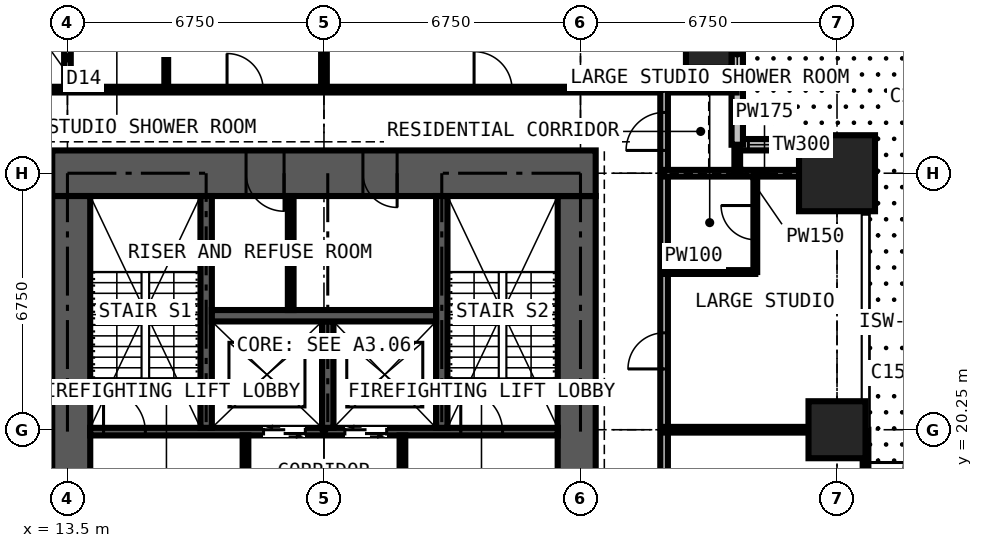
"""IFC4 building model, lengths in metres.
Left out: names, types, materials, properties, quantities, classifications, styles, units other than length and angle.
Written with IfcOpenShell. Run it as: python <this file> out.ifc"""

import sys

from ifc_helpers import new_model, si_unit, direction, frame, frame_2d, origin, origin_2d, place, context, subcontext, project, spatial, rectangle, extrude, element, fill, save


model = new_model("IFC4")
c1 = context("Model", 3, precision=1e-05, world=origin(), true_north=direction((0.0, 1.0)))
c2 = subcontext(c1, "Body", "Model", "MODEL_VIEW")
j1 = project(units=[si_unit("LENGTHUNIT", "METRE"), si_unit("PLANEANGLEUNIT", "RADIAN")], contexts=[c1])
p1 = place(None, origin())
s1 = spatial("IfcSite", under=j1, at=p1, CompositionType="ELEMENT")
p2 = place(p1, origin())
s2 = spatial("IfcBuilding", under=s1, at=p2, CompositionType="ELEMENT")
p3 = place(p2, frame((0.0, 0.0, 142.2)))
s3 = spatial("IfcBuildingStorey", under=s2, at=p3, CompositionType="ELEMENT", Elevation=142.2)
p4 = place(p3, frame((30.375, 30.375, 0.0), z_axis=(0.0, 0.0, 1.0), x_axis=(1.0, 0.0, 0.0)))
e1 = element("IfcColumn", 1, at=p4, inside=s3, PredefinedType="COLUMN", context=c2, shape_type="SweptSolid", body=[
    extrude(rectangle(XDim=1.2, YDim=1.2, at=origin_2d()), origin(), (0.0, 0.0, 1.0), 3.6),
])
p5 = place(p3, frame((33.75, 20.25, 0.0), z_axis=(0.0, 0.0, 1.0), x_axis=(1.0, 0.0, 0.0)))
e2 = element("IfcColumn", 2, at=p5, inside=s3, PredefinedType="COLUMN", context=c2, shape_type="SweptSolid", body=[
    extrude(rectangle(XDim=1.5, YDim=1.5, at=origin_2d()), origin(), (0.0, 0.0, 1.0), 3.6),
])
p6 = place(p3, frame((33.75, 27.0, 0.0), z_axis=(0.0, 0.0, 1.0), x_axis=(1.0, 0.0, 0.0)))
e3 = element("IfcColumn", 3, at=p6, inside=s3, PredefinedType="COLUMN", context=c2, shape_type="SweptSolid", body=[
    extrude(rectangle(XDim=2.0, YDim=2.0, at=origin_2d()), origin(), (0.0, 0.0, 1.0), 3.6),
])
p7 = place(p3, frame((26.9, 14.1, 0.0), z_axis=(0.0, 0.0, 1.0), x_axis=(0.0, 1.0, 0.0)))
e4 = element("IfcWall", 4, at=p7, inside=s3, PredefinedType="SHEAR", context=c2, shape_type="SweptSolid", body=[
    extrude(rectangle(XDim=12.3, YDim=1.0, at=frame_2d((6.15, 0.0))), origin(), (0.0, 0.0, 1.0), 3.6),
])
p8 = place(p7, frame((3.65, 0.0, 0.0)))
e5 = element("IfcOpeningElement", 5, at=p8, cuts=e4, PredefinedType="OPENING", context=c2, shape_type="SweptSolid", body=[
    extrude(rectangle(XDim=1.2, YDim=2.2, at=frame_2d((0.6, 1.1))), frame((0.0, 0.51, 0.0), z_axis=(0.0, -1.0, 0.0), x_axis=(1.0, 0.0, 0.0)), (0.0, 0.0, 1.0), 1.02),
])
p9 = place(p3, frame((27.4, 27.0, 0.0), z_axis=(0.0, 0.0, 1.0), x_axis=(-1.0, 0.0, 0.0)))
e6 = element("IfcWall", 6, at=p9, inside=s3, PredefinedType="SHEAR", context=c2, shape_type="SweptSolid", body=[
    extrude(rectangle(XDim=14.3, YDim=1.2, at=frame_2d((7.15, 0.0))), origin(), (0.0, 0.0, 1.0), 3.6),
])
p10 = place(p9, frame((5.225, 0.0, 0.0)))
e7 = element("IfcOpeningElement", 7, at=p10, cuts=e6, PredefinedType="OPENING", context=c2, shape_type="SweptSolid", body=[
    extrude(rectangle(XDim=0.9, YDim=2.2, at=frame_2d((0.45, 1.1))), frame((0.0, 0.61, 0.0), z_axis=(0.0, -1.0, 0.0), x_axis=(1.0, 0.0, 0.0)), (0.0, 0.0, 1.0), 1.22),
])
p11 = place(p9, frame((8.2, 0.0, 0.0)))
e8 = element("IfcOpeningElement", 8, at=p11, cuts=e6, PredefinedType="OPENING", context=c2, shape_type="SweptSolid", body=[
    extrude(rectangle(XDim=1.0, YDim=2.2, at=frame_2d((0.5, 1.1))), frame((0.0, 0.61, 0.0), z_axis=(0.0, -1.0, 0.0), x_axis=(1.0, 0.0, 0.0)), (0.0, 0.0, 1.0), 1.22),
])
p12 = place(p3, frame((13.6, 26.4, 0.0), z_axis=(0.0, 0.0, 1.0), x_axis=(0.0, -1.0, 0.0)))
e9 = element("IfcWall", 9, at=p12, inside=s3, PredefinedType="SHEAR", context=c2, shape_type="SweptSolid", body=[
    extrude(rectangle(XDim=12.3, YDim=1.0, at=frame_2d((6.15, 0.0))), origin(), (0.0, 0.0, 1.0), 3.6),
])
p13 = place(p12, frame((7.45, 0.0, 0.0)))
e10 = element("IfcOpeningElement", 10, at=p13, cuts=e9, PredefinedType="OPENING", context=c2, shape_type="SweptSolid", body=[
    extrude(rectangle(XDim=1.2, YDim=2.2, at=frame_2d((0.6, 1.1))), frame((0.0, 0.51, 0.0), z_axis=(0.0, -1.0, 0.0), x_axis=(1.0, 0.0, 0.0)), (0.0, 0.0, 1.0), 1.02),
])
p14 = place(p3, frame((34.5, 20.25, 0.0), z_axis=(0.0, 0.0, 1.0), x_axis=(0.0, -1.0, 0.0)))
e11 = element("IfcWall", 11, at=p14, inside=s3, PredefinedType="SOLIDWALL", context=c2, shape_type="SweptSolid", body=[
    extrude(rectangle(XDim=6.75, YDim=0.15, at=frame_2d((3.375, 0.0))), origin(), (0.0, 0.0, 1.0), 3.375),
])
p15 = place(p14, frame((0.863, 0.0, 0.0)))
e12 = element("IfcOpeningElement", 12, at=p15, cuts=e11, PredefinedType="OPENING", context=c2, shape_type="SweptSolid", body=[
    extrude(rectangle(XDim=1.0, YDim=2.2, at=frame_2d((0.5, 1.1))), frame((0.0, 0.085, 0.0), z_axis=(0.0, -1.0, 0.0), x_axis=(1.0, 0.0, 0.0)), (0.0, 0.0, 1.0), 0.17),
])
p16 = place(p14, frame((1.975, 0.0, 0.9)))
e13 = element("IfcOpeningElement", 13, at=p16, cuts=e11, PredefinedType="OPENING", context=c2, shape_type="SweptSolid", body=[
    extrude(rectangle(XDim=1.2, YDim=1.8, at=frame_2d((0.6, 0.9))), frame((0.0, 0.085, 0.0), z_axis=(0.0, -1.0, 0.0), x_axis=(1.0, 0.0, 0.0)), (0.0, 0.0, 1.0), 0.17),
])
p17 = place(p14, frame((4.621, 0.0, 0.0)))
e14 = element("IfcOpeningElement", 14, at=p17, cuts=e11, PredefinedType="OPENING", context=c2, shape_type="SweptSolid", body=[
    extrude(rectangle(XDim=1.0, YDim=2.2, at=frame_2d((0.5, 1.1))), frame((0.0, 0.085, 0.0), z_axis=(0.0, -1.0, 0.0), x_axis=(1.0, 0.0, 0.0)), (0.0, 0.0, 1.0), 0.17),
])
p18 = place(p14, frame((3.592, 0.0, 0.9)))
e15 = element("IfcOpeningElement", 15, at=p18, cuts=e11, PredefinedType="OPENING", context=c2, shape_type="SweptSolid", body=[
    extrude(rectangle(XDim=0.9, YDim=1.8, at=frame_2d((0.45, 0.9))), frame((0.0, 0.085, 0.0), z_axis=(0.0, -1.0, 0.0), x_axis=(1.0, 0.0, 0.0)), (0.0, 0.0, 1.0), 0.17),
])
p19 = place(p3, frame((34.5, 27.75, 0.0), z_axis=(0.0, 0.0, 1.0), x_axis=(-1.0, 0.0, 0.0)))
e16 = element("IfcWall", 16, at=p19, inside=s3, PredefinedType="SOLIDWALL", context=c2, shape_type="SweptSolid", body=[
    extrude(rectangle(XDim=3.375, YDim=0.3, at=frame_2d((1.688, 0.0))), origin(), (0.0, 0.0, 1.0), 3.375),
])
p20 = place(p19, frame((1.883, 0.0, 0.9)))
e17 = element("IfcOpeningElement", 17, at=p20, cuts=e16, PredefinedType="OPENING", context=c2, shape_type="SweptSolid", body=[
    extrude(rectangle(XDim=1.2, YDim=1.8, at=frame_2d((0.6, 0.9))), frame((0.0, 0.16, 0.0), z_axis=(0.0, -1.0, 0.0), x_axis=(1.0, 0.0, 0.0)), (0.0, 0.0, 1.0), 0.32),
])
p21 = place(p3, frame((31.125, 27.75, 0.0), z_axis=(0.0, 0.0, 1.0), x_axis=(0.0, 1.0, 0.0)))
e18 = element("IfcWall", 18, at=p21, inside=s3, PredefinedType="SOLIDWALL", context=c2, shape_type="SweptSolid", body=[
    extrude(rectangle(XDim=3.375, YDim=0.3, at=frame_2d((1.688, 0.0))), origin(), (0.0, 0.0, 1.0), 3.375),
])
p22 = place(p21, frame((1.663, 0.0, 0.9)))
e19 = element("IfcOpeningElement", 19, at=p22, cuts=e18, PredefinedType="OPENING", context=c2, shape_type="SweptSolid", body=[
    extrude(rectangle(XDim=1.5, YDim=1.8, at=frame_2d((0.75, 0.9))), frame((0.0, 0.16, 0.0), z_axis=(0.0, -1.0, 0.0), x_axis=(1.0, 0.0, 0.0)), (0.0, 0.0, 1.0), 0.32),
])
p23 = place(p3, frame((14.1, 20.2, 0.0), z_axis=(0.0, 0.0, 1.0), x_axis=(1.0, 0.0, 0.0)))
e20 = element("IfcWall", 20, at=p23, inside=s3, PredefinedType="SHEAR", context=c2, shape_type="SweptSolid", body=[
    extrude(rectangle(XDim=12.3, YDim=0.2, at=frame_2d((6.15, 0.0))), origin(), (0.0, 0.0, 1.0), 3.6),
])
p24 = place(p23, frame((4.56, 0.0, 0.0)))
e21 = element("IfcOpeningElement", 21, at=p24, cuts=e20, PredefinedType="OPENING", context=c2, shape_type="SweptSolid", body=[
    extrude(rectangle(XDim=1.1, YDim=2.2, at=frame_2d((0.55, 1.1))), frame((0.0, 0.11, 0.0), z_axis=(0.0, -1.0, 0.0), x_axis=(1.0, 0.0, 0.0)), (0.0, 0.0, 1.0), 0.22),
])
p25 = place(p23, frame((6.7, 0.0, 0.0)))
e22 = element("IfcOpeningElement", 22, at=p25, cuts=e20, PredefinedType="OPENING", context=c2, shape_type="SweptSolid", body=[
    extrude(rectangle(XDim=1.1, YDim=2.2, at=frame_2d((0.55, 1.1))), frame((0.0, 0.11, 0.0), z_axis=(0.0, -1.0, 0.0), x_axis=(1.0, 0.0, 0.0)), (0.0, 0.0, 1.0), 0.22),
])
p26 = place(p23, frame((0.35, 0.0, 0.0)))
e23 = element("IfcOpeningElement", 23, at=p26, cuts=e20, PredefinedType="OPENING", context=c2, shape_type="SweptSolid", body=[
    extrude(rectangle(XDim=1.1, YDim=2.2, at=frame_2d((0.55, 1.1))), frame((0.0, 0.11, 0.0), z_axis=(0.0, -1.0, 0.0), x_axis=(1.0, 0.0, 0.0)), (0.0, 0.0, 1.0), 0.22),
])
p27 = place(p23, frame((9.75, 0.0, 0.0)))
e24 = element("IfcOpeningElement", 24, at=p27, cuts=e20, PredefinedType="OPENING", context=c2, shape_type="SweptSolid", body=[
    extrude(rectangle(XDim=1.1, YDim=2.2, at=frame_2d((0.55, 1.1))), frame((0.0, 0.11, 0.0), z_axis=(0.0, -1.0, 0.0), x_axis=(1.0, 0.0, 0.0)), (0.0, 0.0, 1.0), 0.22),
])
for number, where, z_axis, x_axis in (
    (25, (17.15, 20.3, 0.0), (0.0, 0.0, 1.0), (0.0, 1.0, 0.0)),
    (26, (23.35, 20.3, 0.0), (0.0, 0.0, 1.0), (0.0, 1.0, 0.0)),
):
    element("IfcWall", number, at=place(p3, frame(where, z_axis=z_axis, x_axis=x_axis)), inside=s3, PredefinedType="SHEAR", context=c2, shape_type="SweptSolid", body=[
        extrude(rectangle(XDim=6.1, YDim=0.3, at=frame_2d((3.05, 0.0))), origin(), (0.0, 0.0, 1.0), 3.6),
    ])
p28 = place(p3, frame((20.35, 20.3, 0.0), z_axis=(0.0, 0.0, 1.0), x_axis=(0.0, 1.0, 0.0)))
e27 = element("IfcWall", 27, at=p28, inside=s3, PredefinedType="SHEAR", context=c2, shape_type="SweptSolid", body=[
    extrude(rectangle(XDim=2.8, YDim=0.3, at=frame_2d((1.4, 0.0))), origin(), (0.0, 0.0, 1.0), 3.6),
])
p29 = place(p3, frame((17.3, 23.25, 0.0), z_axis=(0.0, 0.0, 1.0), x_axis=(1.0, 0.0, 0.0)))
e28 = element("IfcWall", 28, at=p29, inside=s3, PredefinedType="SHEAR", context=c2, shape_type="SweptSolid", body=[
    extrude(rectangle(XDim=5.9, YDim=0.3, at=frame_2d((2.95, 0.0))), origin(), (0.0, 0.0, 1.0), 3.6),
])
p30 = place(p3, frame((18.185, 16.6, 0.0), z_axis=(0.0, 0.0, 1.0), x_axis=(0.0, 1.0, 0.0)))
e29 = element("IfcWall", 29, at=p30, inside=s3, PredefinedType="PARTITIONING", context=c2, shape_type="SweptSolid", body=[
    extrude(rectangle(XDim=3.5, YDim=0.15, at=frame_2d((1.75, 0.0))), origin(), (0.0, 0.0, 1.0), 3.375),
])
p31 = place(p30, frame((1.15, 0.0, 0.0)))
e30 = element("IfcOpeningElement", 30, at=p31, cuts=e29, PredefinedType="OPENING", context=c2, shape_type="SweptSolid", body=[
    extrude(rectangle(XDim=1.2, YDim=2.2, at=frame_2d((0.6, 1.1))), frame((0.0, 0.085, 0.0), z_axis=(0.0, -1.0, 0.0), x_axis=(1.0, 0.0, 0.0)), (0.0, 0.0, 1.0), 0.17),
])
p32 = place(p3, frame((22.315, 16.6, 0.0), z_axis=(0.0, 0.0, 1.0), x_axis=(0.0, 1.0, 0.0)))
e31 = element("IfcWall", 31, at=p32, inside=s3, PredefinedType="PARTITIONING", context=c2, shape_type="SweptSolid", body=[
    extrude(rectangle(XDim=3.5, YDim=0.15, at=frame_2d((1.75, 0.0))), origin(), (0.0, 0.0, 1.0), 3.375),
])
p33 = place(p32, frame((1.15, 0.0, 0.0)))
e32 = element("IfcOpeningElement", 32, at=p33, cuts=e31, PredefinedType="OPENING", context=c2, shape_type="SweptSolid", body=[
    extrude(rectangle(XDim=1.2, YDim=2.2, at=frame_2d((0.6, 1.1))), frame((0.0, 0.085, 0.0), z_axis=(0.0, -1.0, 0.0), x_axis=(1.0, 0.0, 0.0)), (0.0, 0.0, 1.0), 0.17),
])
p34 = place(p3, frame((19.375, 23.4, 0.0), z_axis=(0.0, 0.0, 1.0), x_axis=(0.0, 1.0, 0.0)))
e33 = element("IfcWall", 33, at=p34, inside=s3, PredefinedType="PARTITIONING", context=c2, shape_type="SweptSolid", body=[
    extrude(rectangle(XDim=3.0, YDim=0.15, at=frame_2d((1.5, 0.0))), origin(), (0.0, 0.0, 1.0), 3.375),
])
p35 = place(p3, frame((11.3, 29.2, 0.0), z_axis=(0.0, 0.0, 1.0), x_axis=(1.0, 0.0, 0.0)))
e34 = element("IfcWall", 34, at=p35, inside=s3, PredefinedType="PARTITIONING", context=c2, shape_type="SweptSolid", body=[
    extrude(rectangle(XDim=19.809, YDim=0.15, at=frame_2d((9.904, 0.0))), origin(), (0.0, 0.0, 1.0), 3.375),
])
p36 = place(p35, frame((12.9, 0.0, 0.0)))
e35 = element("IfcOpeningElement", 35, at=p36, cuts=e34, PredefinedType="OPENING", context=c2, shape_type="SweptSolid", body=[
    extrude(rectangle(XDim=1.0, YDim=2.2, at=frame_2d((0.5, 1.1))), frame((0.0, 0.085, 0.0), z_axis=(0.0, -1.0, 0.0), x_axis=(1.0, 0.0, 0.0)), (0.0, 0.0, 1.0), 0.17),
])
p37 = place(p35, frame((6.4, 0.0, 0.0)))
e36 = element("IfcOpeningElement", 36, at=p37, cuts=e34, PredefinedType="OPENING", context=c2, shape_type="SweptSolid", body=[
    extrude(rectangle(XDim=0.95, YDim=2.2, at=frame_2d((0.475, 1.1))), frame((0.0, 0.085, 0.0), z_axis=(0.0, -1.0, 0.0), x_axis=(1.0, 0.0, 0.0)), (0.0, 0.0, 1.0), 0.17),
])
p38 = place(p35, frame((0.6, 0.0, 0.0)))
e37 = element("IfcOpeningElement", 37, at=p38, cuts=e34, PredefinedType="OPENING", context=c2, shape_type="SweptSolid", body=[
    extrude(rectangle(XDim=1.0, YDim=2.2, at=frame_2d((0.5, 1.1))), frame((0.0, 0.085, 0.0), z_axis=(0.0, -1.0, 0.0), x_axis=(1.0, 0.0, 0.0)), (0.0, 0.0, 1.0), 0.17),
])
p39 = place(p3, frame((13.5, 29.2, 0.0), z_axis=(0.0, 0.0, 1.0), x_axis=(0.0, 1.0, 0.0)))
e38 = element("IfcWall", 38, at=p39, inside=s3, PredefinedType="PARTITIONING", context=c2, shape_type="SweptSolid", body=[
    extrude(rectangle(XDim=5.284, YDim=0.175, at=frame_2d((2.642, 0.0))), origin(), (0.0, 0.0, 1.0), 2.806),
])
p40 = place(p3, frame((16.1, 29.2, 0.0), z_axis=(0.0, 0.0, 1.0), x_axis=(0.0, 1.0, 0.0)))
e39 = element("IfcWall", 39, at=p40, inside=s3, PredefinedType="PARTITIONING", context=c2, shape_type="SweptSolid", body=[
    extrude(rectangle(XDim=2.4, YDim=0.1, at=frame_2d((1.2, 0.0))), origin(), (0.0, 0.0, 1.0), 3.375),
])
p41 = place(p3, frame((20.25, 29.2, 0.0), z_axis=(0.0, 0.0, 1.0), x_axis=(0.0, 1.0, 0.0)))
e40 = element("IfcWall", 40, at=p41, inside=s3, PredefinedType="PARTITIONING", context=c2, shape_type="SweptSolid", body=[
    extrude(rectangle(XDim=5.284, YDim=0.15, at=frame_2d((2.642, 0.0))), origin(), (0.0, 0.0, 1.0), 2.806),
])
p42 = place(p3, frame((29.2, 11.3, 0.0), z_axis=(0.0, 0.0, 1.0), x_axis=(0.0, 1.0, 0.0)))
e41 = element("IfcWall", 41, at=p42, inside=s3, PredefinedType="PARTITIONING", context=c2, shape_type="SweptSolid", body=[
    extrude(rectangle(XDim=17.9, YDim=0.2, at=frame_2d((8.95, 0.0))), origin(), (0.0, 0.0, 1.0), 3.375),
])
p43 = place(p42, frame((10.55, 0.0, 0.0)))
e42 = element("IfcOpeningElement", 42, at=p43, cuts=e41, PredefinedType="OPENING", context=c2, shape_type="SweptSolid", body=[
    extrude(rectangle(XDim=0.95, YDim=2.2, at=frame_2d((0.475, 1.1))), frame((0.0, 0.11, 0.0), z_axis=(0.0, -1.0, 0.0), x_axis=(1.0, 0.0, 0.0)), (0.0, 0.0, 1.0), 0.22),
])
p44 = place(p42, frame((16.3, 0.0, 0.0)))
e43 = element("IfcOpeningElement", 43, at=p44, cuts=e41, PredefinedType="OPENING", context=c2, shape_type="SweptSolid", body=[
    extrude(rectangle(XDim=1.0, YDim=2.2, at=frame_2d((0.5, 1.1))), frame((0.0, 0.11, 0.0), z_axis=(0.0, -1.0, 0.0), x_axis=(1.0, 0.0, 0.0)), (0.0, 0.0, 1.0), 0.22),
])
p45 = place(p42, frame((5.1, 0.0, 0.0)))
e44 = element("IfcOpeningElement", 44, at=p45, cuts=e41, PredefinedType="OPENING", context=c2, shape_type="SweptSolid", body=[
    extrude(rectangle(XDim=0.95, YDim=2.2, at=frame_2d((0.475, 1.1))), frame((0.0, 0.11, 0.0), z_axis=(0.0, -1.0, 0.0), x_axis=(1.0, 0.0, 0.0)), (0.0, 0.0, 1.0), 0.22),
])
p46 = place(p3, frame((29.2, 20.25, 0.0), z_axis=(0.0, 0.0, 1.0), x_axis=(1.0, 0.0, 0.0)))
e45 = element("IfcWall", 45, at=p46, inside=s3, PredefinedType="PARTITIONING", context=c2, shape_type="SweptSolid", body=[
    extrude(rectangle(XDim=5.284, YDim=0.15, at=frame_2d((2.642, 0.0))), origin(), (0.0, 0.0, 1.0), 2.806),
])
p47 = place(p3, frame((29.2, 24.4, 0.0), z_axis=(0.0, 0.0, 1.0), x_axis=(1.0, 0.0, 0.0)))
e46 = element("IfcWall", 46, at=p47, inside=s3, PredefinedType="PARTITIONING", context=c2, shape_type="SweptSolid", body=[
    extrude(rectangle(XDim=2.4, YDim=0.1, at=frame_2d((1.2, 0.0))), origin(), (0.0, 0.0, 1.0), 3.375),
])
p48 = place(p3, frame((29.2, 27.0, 0.0), z_axis=(0.0, 0.0, 1.0), x_axis=(1.0, 0.0, 0.0)))
e47 = element("IfcWall", 47, at=p48, inside=s3, PredefinedType="PARTITIONING", context=c2, shape_type="SweptSolid", body=[
    extrude(rectangle(XDim=5.284, YDim=0.175, at=frame_2d((2.642, 0.0))), origin(), (0.0, 0.0, 1.0), 2.806),
])
p49 = place(p3, frame((31.125, 27.0, 0.0), z_axis=(0.0, 0.0, 1.0), x_axis=(0.0, 1.0, 0.0)))
e48 = element("IfcWall", 48, at=p49, inside=s3, PredefinedType="PARTITIONING", context=c2, shape_type="SweptSolid", body=[
    extrude(rectangle(XDim=0.734, YDim=0.15, at=frame_2d((0.367, 0.0))), origin(), (0.0, 0.0, 1.0), 3.375),
])
p50 = place(p3, frame((31.6, 24.4, 0.0), z_axis=(0.0, 0.0, 1.0), x_axis=(0.0, 1.0, 0.0)))
e49 = element("IfcWall", 49, at=p50, inside=s3, PredefinedType="PARTITIONING", context=c2, shape_type="SweptSolid", body=[
    extrude(rectangle(XDim=2.6, YDim=0.1, at=frame_2d((1.3, 0.0))), origin(), (0.0, 0.0, 1.0), 3.375),
])
p51 = place(p50, frame((0.85, 0.0, 0.0)))
e50 = element("IfcOpeningElement", 50, at=p51, cuts=e49, PredefinedType="OPENING", context=c2, shape_type="SweptSolid", body=[
    extrude(rectangle(XDim=0.9, YDim=2.2, at=frame_2d((0.45, 1.1))), frame((0.0, 0.06, 0.0), z_axis=(0.0, -1.0, 0.0), x_axis=(1.0, 0.0, 0.0)), (0.0, 0.0, 1.0), 0.12),
])
p52 = place(p15, origin())
e51 = element("IfcDoor", 51, at=p52, inside=s3, OperationType="SINGLE_SWING_LEFT", PredefinedType="DOOR", context=c2, shape_type="SweptSolid", body=[
    extrude(rectangle(XDim=1.0, YDim=2.2, at=frame_2d((0.5, 1.1))), frame((0.0, 0.025, 0.0), z_axis=(0.0, -1.0, 0.0), x_axis=(1.0, 0.0, 0.0)), (0.0, 0.0, 1.0), 0.05),
])
fill(e12, e51)
p53 = place(p20, origin())
e52 = element("IfcWindow", 52, at=p53, inside=s3, PartitioningType="SINGLE_PANEL", PredefinedType="WINDOW", context=c2, shape_type="SweptSolid", body=[
    extrude(rectangle(XDim=1.2, YDim=1.8, at=frame_2d((0.6, 0.9))), frame((0.0, 0.03, 0.0), z_axis=(0.0, -1.0, 0.0), x_axis=(1.0, 0.0, 0.0)), (0.0, 0.0, 1.0), 0.06),
])
fill(e17, e52)
p54 = place(p22, origin())
e53 = element("IfcWindow", 53, at=p54, inside=s3, PartitioningType="SINGLE_PANEL", PredefinedType="WINDOW", context=c2, shape_type="SweptSolid", body=[
    extrude(rectangle(XDim=1.5, YDim=1.8, at=frame_2d((0.75, 0.9))), frame((0.0, 0.03, 0.0), z_axis=(0.0, -1.0, 0.0), x_axis=(1.0, 0.0, 0.0)), (0.0, 0.0, 1.0), 0.06),
])
fill(e19, e53)
p55 = place(p24, origin())
e54 = element("IfcDoor", 54, at=p55, inside=s3, OperationType="DOUBLE_DOOR_SLIDING", PredefinedType="DOOR", context=c2, shape_type="SweptSolid", body=[
    extrude(rectangle(XDim=1.1, YDim=2.2, at=frame_2d((0.55, 1.1))), frame((0.0, 0.025, 0.0), z_axis=(0.0, -1.0, 0.0), x_axis=(1.0, 0.0, 0.0)), (0.0, 0.0, 1.0), 0.05),
])
fill(e21, e54)
p56 = place(p25, origin())
e55 = element("IfcDoor", 55, at=p56, inside=s3, OperationType="DOUBLE_DOOR_SLIDING", PredefinedType="DOOR", context=c2, shape_type="SweptSolid", body=[
    extrude(rectangle(XDim=1.1, YDim=2.2, at=frame_2d((0.55, 1.1))), frame((0.0, 0.025, 0.0), z_axis=(0.0, -1.0, 0.0), x_axis=(1.0, 0.0, 0.0)), (0.0, 0.0, 1.0), 0.05),
])
fill(e22, e55)
p57 = place(p10, origin())
e56 = element("IfcDoor", 56, at=p57, inside=s3, OperationType="SINGLE_SWING_LEFT", PredefinedType="DOOR", context=c2, shape_type="SweptSolid", body=[
    extrude(rectangle(XDim=0.9, YDim=2.2, at=frame_2d((0.45, 1.1))), frame((0.0, 0.4, 0.0), z_axis=(0.0, -1.0, 0.0), x_axis=(1.0, 0.0, 0.0)), (0.0, 0.0, 1.0), 0.8),
])
fill(e7, e56)
p58 = place(p11, origin())
e57 = element("IfcDoor", 57, at=p58, inside=s3, OperationType="SINGLE_SWING_LEFT", PredefinedType="DOOR", context=c2, shape_type="SweptSolid", body=[
    extrude(rectangle(XDim=1.0, YDim=2.2, at=frame_2d((0.5, 1.1))), frame((0.0, 0.025, 0.0), z_axis=(0.0, -1.0, 0.0), x_axis=(1.0, 0.0, 0.0)), (0.0, 0.0, 1.0), 0.05),
])
fill(e8, e57)
p59 = place(p26, origin())
e58 = element("IfcDoor", 58, at=p59, inside=s3, OperationType="SINGLE_SWING_LEFT", PredefinedType="DOOR", context=c2, shape_type="SweptSolid", body=[
    extrude(rectangle(XDim=1.1, YDim=2.2, at=frame_2d((0.55, 1.1))), frame((0.0, 0.025, 0.0), z_axis=(0.0, -1.0, 0.0), x_axis=(1.0, 0.0, 0.0)), (0.0, 0.0, 1.0), 0.05),
])
fill(e23, e58)
p60 = place(p27, origin())
e59 = element("IfcDoor", 59, at=p60, inside=s3, OperationType="SINGLE_SWING_LEFT", PredefinedType="DOOR", context=c2, shape_type="SweptSolid", body=[
    extrude(rectangle(XDim=1.1, YDim=2.2, at=frame_2d((0.55, 1.1))), frame((0.0, 0.025, 0.0), z_axis=(0.0, -1.0, 0.0), x_axis=(1.0, 0.0, 0.0)), (0.0, 0.0, 1.0), 0.05),
])
fill(e24, e59)
p61 = place(p43, origin())
e60 = element("IfcDoor", 60, at=p61, inside=s3, OperationType="SINGLE_SWING_LEFT", PredefinedType="DOOR", context=c2, shape_type="SweptSolid", body=[
    extrude(rectangle(XDim=0.95, YDim=2.2, at=frame_2d((0.475, 1.1))), frame((0.0, 0.025, 0.0), z_axis=(0.0, -1.0, 0.0), x_axis=(1.0, 0.0, 0.0)), (0.0, 0.0, 1.0), 0.05),
])
fill(e42, e60)
p62 = place(p51, origin())
e61 = element("IfcDoor", 61, at=p62, inside=s3, OperationType="SINGLE_SWING_RIGHT", PredefinedType="DOOR", context=c2, shape_type="SweptSolid", body=[
    extrude(rectangle(XDim=0.9, YDim=2.2, at=frame_2d((0.45, 1.1))), frame((0.0, 0.025, 0.0), z_axis=(0.0, -1.0, 0.0), x_axis=(1.0, 0.0, 0.0)), (0.0, 0.0, 1.0), 0.05),
])
fill(e50, e61)
p63 = place(p44, origin())
e62 = element("IfcDoor", 62, at=p63, inside=s3, OperationType="SINGLE_SWING_LEFT", PredefinedType="DOOR", context=c2, shape_type="SweptSolid", body=[
    extrude(rectangle(XDim=1.0, YDim=2.2, at=frame_2d((0.5, 1.1))), frame((0.0, 0.025, 0.0), z_axis=(0.0, -1.0, 0.0), x_axis=(1.0, 0.0, 0.0)), (0.0, 0.0, 1.0), 0.05),
])
fill(e43, e62)
p64 = place(p36, origin())
e63 = element("IfcDoor", 63, at=p64, inside=s3, OperationType="SINGLE_SWING_LEFT", PredefinedType="DOOR", context=c2, shape_type="SweptSolid", body=[
    extrude(rectangle(XDim=1.0, YDim=2.2, at=frame_2d((0.5, 1.1))), frame((0.0, 0.025, 0.0), z_axis=(0.0, -1.0, 0.0), x_axis=(1.0, 0.0, 0.0)), (0.0, 0.0, 1.0), 0.05),
])
fill(e35, e63)
p65 = place(p37, origin())
e64 = element("IfcDoor", 64, at=p65, inside=s3, OperationType="SINGLE_SWING_LEFT", PredefinedType="DOOR", context=c2, shape_type="SweptSolid", body=[
    extrude(rectangle(XDim=0.95, YDim=2.2, at=frame_2d((0.475, 1.1))), frame((0.0, 0.025, 0.0), z_axis=(0.0, -1.0, 0.0), x_axis=(1.0, 0.0, 0.0)), (0.0, 0.0, 1.0), 0.05),
])
fill(e36, e64)
save(model, sys.argv[1])
